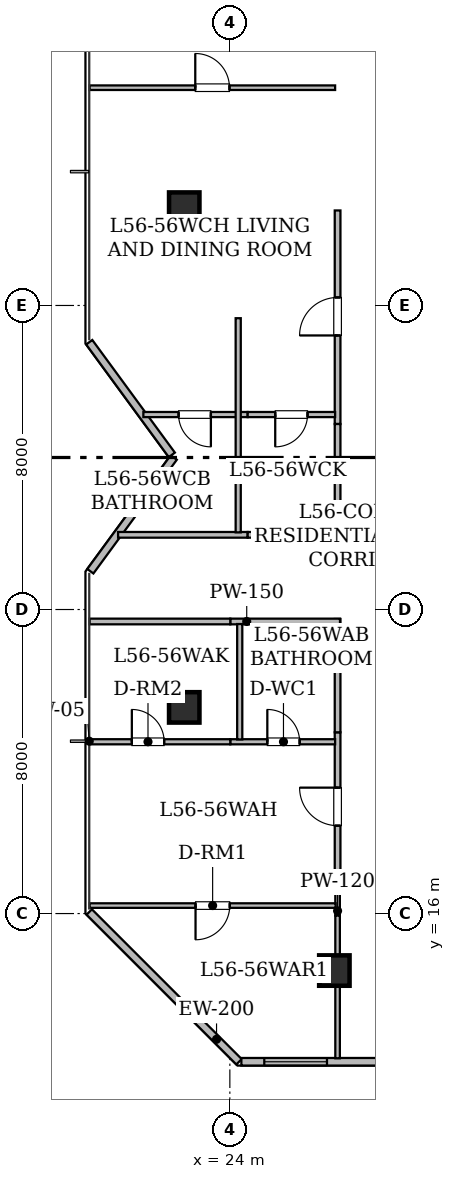
"""IFC4 building model, lengths in metres.
Left out: names, types, materials, properties, quantities, classifications, styles, units other than length and angle.
Written with IfcOpenShell. Run it as: python <this file> out.ifc"""

import sys

from ifc_helpers import new_model, si_unit, direction, frame, frame_2d, origin, origin_2d, place, context, subcontext, project, spatial, rectangle, hollow_rectangle, extrude, element, fill, save


model = new_model("IFC4")
c1 = context("Model", 3, precision=1e-05, world=origin(), true_north=direction((0.0, 1.0)))
c2 = subcontext(c1, "Body", "Model", "MODEL_VIEW")
j1 = project(units=[si_unit("LENGTHUNIT", "METRE"), si_unit("PLANEANGLEUNIT", "RADIAN")], contexts=[c1])
p1 = place(None, origin())
s1 = spatial("IfcSite", under=j1, at=p1, CompositionType="ELEMENT")
p2 = place(p1, origin())
s2 = spatial("IfcBuilding", under=s1, at=p2, CompositionType="ELEMENT")
p3 = place(p2, frame((0.0, 0.0, 220.85)))
s3 = spatial("IfcBuildingStorey", under=s2, at=p3, CompositionType="ELEMENT", Elevation=220.85)
for number, where, z_axis, x_axis in (
    (1, (26.75, 14.5, 0.0), (0.0, 0.0, 1.0), (1.0, 0.0, 0.0)),
    (2, (22.8, 21.425, 0.0), (0.0, 0.0, 1.0), (1.0, 0.0, 0.0)),
    (3, (22.8, 34.575, 0.0), (0.0, 0.0, 1.0), (1.0, 0.0, 0.0)),
):
    element("IfcColumn", number, at=place(p3, frame(where, z_axis=z_axis, x_axis=x_axis)), inside=s3, PredefinedType="COLUMN", context=c2, shape_type="SweptSolid", body=[
        extrude(hollow_rectangle(XDim=0.8, YDim=0.8, WallThickness=0.04, at=origin_2d()), origin(), (0.0, 0.0, 1.0), 3.65),
    ])
p4 = place(p3, frame((24.241, 12.1, 0.0), z_axis=(0.0, 0.0, 1.0), x_axis=(-0.707106781187, 0.707106781187, 0.0)))
e4 = element("IfcWall", 4, at=p4, inside=s3, PredefinedType="STANDARD", context=c2, shape_type="SweptSolid", body=[
    extrude(rectangle(XDim=5.573, YDim=0.2, at=frame_2d((2.787, 0.0))), origin(), (0.0, 0.0, 1.0), 3.43),
])
p5 = place(p3, frame((20.329, 25.007, 0.0), z_axis=(0.0, 0.0, 1.0), x_axis=(0.591366515379, 0.806402904564, 0.0)))
e5 = element("IfcWall", 5, at=p5, inside=s3, PredefinedType="STANDARD", context=c2, shape_type="SweptSolid", body=[
    extrude(rectangle(XDim=3.711, YDim=0.2, at=frame_2d((1.856, 0.0))), origin(), (0.0, 0.0, 1.0), 3.43),
])
p6 = place(p3, frame((22.473, 28.069, 0.0), z_axis=(0.0, 0.0, 1.0), x_axis=(-0.591248456881, 0.80648946815, 0.0)))
e6 = element("IfcWall", 6, at=p6, inside=s3, PredefinedType="STANDARD", context=c2, shape_type="SweptSolid", body=[
    extrude(rectangle(XDim=3.675, YDim=0.2, at=frame_2d((1.837, 0.0))), origin(), (0.0, 0.0, 1.0), 3.43),
])
p7 = place(p3, frame((65.696, 12.1, 0.0), z_axis=(0.0, 0.0, 1.0), x_axis=(-1.0, 0.0, 0.0)))
e7 = element("IfcWall", 7, at=p7, inside=s3, PredefinedType="STANDARD", context=c2, shape_type="SweptSolid", body=[
    extrude(rectangle(XDim=41.393, YDim=0.2, at=frame_2d((20.697, 0.0))), origin(), (0.0, 0.0, 1.0), 3.43),
])
p8 = place(p7, frame((34.521, 0.0, 0.85)))
e8 = element("IfcOpeningElement", 8, at=p8, cuts=e7, PredefinedType="OPENING", context=c2, shape_type="SweptSolid", body=[
    extrude(rectangle(XDim=1.65, YDim=1.55, at=frame_2d((0.825, 0.775))), frame((0.0, 0.11, 0.0), z_axis=(0.0, -1.0, 0.0), x_axis=(1.0, 0.0, 0.0)), (0.0, 0.0, 1.0), 0.22),
])
p9 = place(p7, frame((39.14, 0.0, 0.85)))
e9 = element("IfcOpeningElement", 9, at=p9, cuts=e7, PredefinedType="OPENING", context=c2, shape_type="SweptSolid", body=[
    extrude(rectangle(XDim=1.65, YDim=1.55, at=frame_2d((0.825, 0.775))), frame((0.0, 0.11, 0.0), z_axis=(0.0, -1.0, 0.0), x_axis=(1.0, 0.0, 0.0)), (0.0, 0.0, 1.0), 0.22),
])
p10 = place(p7, frame((15.596, 0.0, 0.8)))
e10 = element("IfcOpeningElement", 10, at=p10, cuts=e7, PredefinedType="OPENING", context=c2, shape_type="SweptSolid", body=[
    extrude(rectangle(XDim=1.2, YDim=1.5, at=frame_2d((0.6, 0.75))), frame((0.0, 0.11, 0.0), z_axis=(0.0, -1.0, 0.0), x_axis=(1.0, 0.0, 0.0)), (0.0, 0.0, 1.0), 0.22),
])
p11 = place(p7, frame((19.706, 0.0, 0.85)))
e11 = element("IfcOpeningElement", 11, at=p11, cuts=e7, PredefinedType="OPENING", context=c2, shape_type="SweptSolid", body=[
    extrude(rectangle(XDim=1.65, YDim=1.55, at=frame_2d((0.825, 0.775))), frame((0.0, 0.11, 0.0), z_axis=(0.0, -1.0, 0.0), x_axis=(1.0, 0.0, 0.0)), (0.0, 0.0, 1.0), 0.22),
])
p12 = place(p7, frame((11.036, 0.0, 0.85)))
e12 = element("IfcOpeningElement", 12, at=p12, cuts=e7, PredefinedType="OPENING", context=c2, shape_type="SweptSolid", body=[
    extrude(rectangle(XDim=1.65, YDim=1.55, at=frame_2d((0.825, 0.775))), frame((0.0, 0.11, 0.0), z_axis=(0.0, -1.0, 0.0), x_axis=(1.0, 0.0, 0.0)), (0.0, 0.0, 1.0), 0.22),
])
p13 = place(p7, frame((4.786, 0.0, 0.85)))
e13 = element("IfcOpeningElement", 13, at=p13, cuts=e7, PredefinedType="OPENING", context=c2, shape_type="SweptSolid", body=[
    extrude(rectangle(XDim=1.65, YDim=1.55, at=frame_2d((0.825, 0.775))), frame((0.0, 0.11, 0.0), z_axis=(0.0, -1.0, 0.0), x_axis=(1.0, 0.0, 0.0)), (0.0, 0.0, 1.0), 0.22),
])
p14 = place(p3, frame((34.114, 16.835, 0.0), z_axis=(0.0, 0.0, 1.0), x_axis=(-1.0, 0.0, 0.0)))
e14 = element("IfcWall", 14, at=p14, inside=s3, PredefinedType="STANDARD", context=c2, shape_type="SweptSolid", body=[
    extrude(rectangle(XDim=7.214, YDim=0.15, at=frame_2d((3.607, 0.0))), origin(), (0.0, 0.0, 1.0), 2.725),
])
p15 = place(p14, frame((3.053, 0.0, 0.0)))
e15 = element("IfcOpeningElement", 15, at=p15, cuts=e14, PredefinedType="OPENING", context=c2, shape_type="SweptSolid", body=[
    extrude(rectangle(XDim=1.15, YDim=2.2, at=frame_2d((0.575, 1.1))), frame((0.0, 0.085, 0.0), z_axis=(0.0, -1.0, 0.0), x_axis=(1.0, 0.0, 0.0)), (0.0, 0.0, 1.0), 0.17),
])
p16 = place(p3, frame((26.835, 16.9, 0.0), z_axis=(0.0, 0.0, 1.0), x_axis=(0.0, 1.0, 0.0)))
e16 = element("IfcWall", 16, at=p16, inside=s3, PredefinedType="STANDARD", context=c2, shape_type="SweptSolid", body=[
    extrude(rectangle(XDim=3.869, YDim=0.15, at=frame_2d((1.935, 0.0))), origin(), (0.0, 0.0, 1.0), 2.725),
])
p17 = place(p16, frame((1.413, 0.0, 0.0)))
e17 = element("IfcOpeningElement", 17, at=p17, cuts=e16, PredefinedType="OPENING", context=c2, shape_type="SweptSolid", body=[
    extrude(rectangle(XDim=1.0, YDim=2.15, at=frame_2d((0.5, 1.075))), frame((0.0, 0.085, 0.0), z_axis=(0.0, -1.0, 0.0), x_axis=(1.0, 0.0, 0.0)), (0.0, 0.0, 1.0), 0.17),
])
p18 = place(p3, frame((26.835, 20.769, 0.0), z_axis=(0.0, 0.0, 1.0), x_axis=(0.0, 1.0, 0.0)))
e18 = element("IfcWall", 18, at=p18, inside=s3, PredefinedType="STANDARD", context=c2, shape_type="SweptSolid", body=[
    extrude(rectangle(XDim=2.981, YDim=0.15, at=frame_2d((1.49, 0.0))), origin(), (0.0, 0.0, 1.0), 3.43),
])
p19 = place(p3, frame((26.898, 23.685, 0.0), z_axis=(0.0, 0.0, 1.0), x_axis=(-1.0, 0.0, 0.0)))
e19 = element("IfcWall", 19, at=p19, inside=s3, PredefinedType="STANDARD", context=c2, shape_type="SweptSolid", body=[
    extrude(rectangle(XDim=2.887, YDim=0.15, at=frame_2d((1.443, 0.0))), origin(), (0.0, 0.0, 1.0), 3.43),
])
p20 = place(p3, frame((24.011, 23.685, 0.0), z_axis=(0.0, 0.0, 1.0), x_axis=(-1.0, 0.0, 0.0)))
e20 = element("IfcWall", 20, at=p20, inside=s3, PredefinedType="STANDARD", context=c2, shape_type="SweptSolid", body=[
    extrude(rectangle(XDim=3.701, YDim=0.15, at=frame_2d((1.851, 0.0))), origin(), (0.0, 0.0, 1.0), 2.887),
])
p21 = place(p3, frame((26.835, 28.881, 0.0), z_axis=(0.0, 0.0, 1.0), x_axis=(0.0, 1.0, 0.0)))
e21 = element("IfcWall", 21, at=p21, inside=s3, PredefinedType="STANDARD", context=c2, shape_type="SweptSolid", body=[
    extrude(rectangle(XDim=5.619, YDim=0.15, at=frame_2d((2.81, 0.0))), origin(), (0.0, 0.0, 1.0), 3.065),
])
p22 = place(p21, frame((2.33, 0.0, 0.0)))
e22 = element("IfcOpeningElement", 22, at=p22, cuts=e21, PredefinedType="OPENING", context=c2, shape_type="SweptSolid", body=[
    extrude(rectangle(XDim=1.0, YDim=2.15, at=frame_2d((0.5, 1.075))), frame((0.0, 0.085, 0.0), z_axis=(0.0, -1.0, 0.0), x_axis=(1.0, 0.0, 0.0)), (0.0, 0.0, 1.0), 0.17),
])
p23 = place(p3, frame((21.059, 25.965, 0.0), z_axis=(0.0, 0.0, 1.0), x_axis=(1.0, 0.0, 0.0)))
e23 = element("IfcWall", 23, at=p23, inside=s3, PredefinedType="STANDARD", context=c2, shape_type="SweptSolid", body=[
    extrude(rectangle(XDim=3.41, YDim=0.15, at=frame_2d((1.705, 0.0))), origin(), (0.0, 0.0, 1.0), 2.887),
])
p24 = place(p3, frame((24.469, 25.965, 0.0), z_axis=(0.0, 0.0, 1.0), x_axis=(1.0, 0.0, 0.0)))
e24 = element("IfcWall", 24, at=p24, inside=s3, PredefinedType="STANDARD", context=c2, shape_type="SweptSolid", body=[
    extrude(rectangle(XDim=2.431, YDim=0.15, at=frame_2d((1.215, 0.0))), origin(), (0.0, 0.0, 1.0), 3.43),
])
p25 = place(p3, frame((26.835, 25.9, 0.0), z_axis=(0.0, 0.0, 1.0), x_axis=(0.0, 1.0, 0.0)))
e25 = element("IfcWall", 25, at=p25, inside=s3, PredefinedType="STANDARD", context=c2, shape_type="SweptSolid", body=[
    extrude(rectangle(XDim=2.981, YDim=0.15, at=frame_2d((1.491, 0.0))), origin(), (0.0, 0.0, 1.0), 3.43),
])
p26 = place(p3, frame((26.835, 15.947, 0.0), z_axis=(0.0, 0.0, 1.0), x_axis=(0.0, 1.0, 0.0)))
e26 = element("IfcWall", 26, at=p26, inside=s3, PredefinedType="PARTITIONING", context=c2, shape_type="SweptSolid", body=[
    extrude(rectangle(XDim=0.823, YDim=0.12, at=frame_2d((0.412, 0.0))), origin(), (0.0, 0.0, 1.0), 3.43),
])
p27 = place(p3, frame((26.835, 12.192, 0.0), z_axis=(0.0, 0.0, 1.0), x_axis=(0.0, 1.0, 0.0)))
e27 = element("IfcWall", 27, at=p27, inside=s3, PredefinedType="PARTITIONING", context=c2, shape_type="SweptSolid", body=[
    extrude(rectangle(XDim=3.755, YDim=0.12, at=frame_2d((1.877, 0.0))), origin(), (0.0, 0.0, 1.0), 2.725),
])
p28 = place(p3, frame((24.011, 20.52, 0.0), z_axis=(0.0, 0.0, 1.0), x_axis=(1.0, 0.0, 0.0)))
e28 = element("IfcWall", 28, at=p28, inside=s3, PredefinedType="PARTITIONING", context=c2, shape_type="SweptSolid", body=[
    extrude(rectangle(XDim=2.759, YDim=0.135, at=frame_2d((1.379, 0.0))), origin(), (0.0, 0.0, 1.0), 2.725),
])
p29 = place(p28, frame((0.975, 0.0, 0.0)))
e29 = element("IfcOpeningElement", 29, at=p29, cuts=e28, PredefinedType="OPENING", context=c2, shape_type="SweptSolid", body=[
    extrude(rectangle(XDim=0.85, YDim=2.1, at=frame_2d((0.425, 1.05))), frame((0.0, 0.077, 0.0), z_axis=(0.0, -1.0, 0.0), x_axis=(1.0, 0.0, 0.0)), (0.0, 0.0, 1.0), 0.155),
])
p30 = place(p3, frame((20.31, 20.52, 0.0), z_axis=(0.0, 0.0, 1.0), x_axis=(1.0, 0.0, 0.0)))
e30 = element("IfcWall", 30, at=p30, inside=s3, PredefinedType="PARTITIONING", context=c2, shape_type="SweptSolid", body=[
    extrude(rectangle(XDim=3.701, YDim=0.135, at=frame_2d((1.851, 0.0))), origin(), (0.0, 0.0, 1.0), 2.887),
])
p31 = place(p30, frame((1.111, 0.0, 0.0)))
e31 = element("IfcOpeningElement", 31, at=p31, cuts=e30, PredefinedType="OPENING", context=c2, shape_type="SweptSolid", body=[
    extrude(rectangle(XDim=0.85, YDim=2.1, at=frame_2d((0.425, 1.05))), frame((0.0, 0.077, 0.0), z_axis=(0.0, -1.0, 0.0), x_axis=(1.0, 0.0, 0.0)), (0.0, 0.0, 1.0), 0.155),
])
p32 = place(p3, frame((26.783, 16.21, 0.0), z_axis=(0.0, 0.0, 1.0), x_axis=(-1.0, 0.0, 0.0)))
e32 = element("IfcWall", 32, at=p32, inside=s3, PredefinedType="PARTITIONING", context=c2, shape_type="SweptSolid", body=[
    extrude(rectangle(XDim=6.473, YDim=0.12, at=frame_2d((3.236, 0.0))), origin(), (0.0, 0.0, 1.0), 2.887),
])
p33 = place(p32, frame((2.786, 0.0, 0.0)))
e33 = element("IfcOpeningElement", 33, at=p33, cuts=e32, PredefinedType="OPENING", context=c2, shape_type="SweptSolid", body=[
    extrude(rectangle(XDim=0.9, YDim=2.1, at=frame_2d((0.45, 1.05))), frame((0.0, 0.07, 0.0), z_axis=(0.0, -1.0, 0.0), x_axis=(1.0, 0.0, 0.0)), (0.0, 0.0, 1.0), 0.14),
])
p34 = place(p3, frame((24.26, 20.581, 0.0), z_axis=(0.0, 0.0, 1.0), x_axis=(0.0, 1.0, 0.0)))
e34 = element("IfcWall", 34, at=p34, inside=s3, PredefinedType="PARTITIONING", context=c2, shape_type="SweptSolid", body=[
    extrude(rectangle(XDim=3.037, YDim=0.135, at=frame_2d((1.519, 0.0))), origin(), (0.0, 0.0, 1.0), 2.725),
])
p35 = place(p3, frame((24.469, 29.13, 0.0), z_axis=(0.0, 0.0, 1.0), x_axis=(-1.0, 0.0, 0.0)))
e35 = element("IfcWall", 35, at=p35, inside=s3, PredefinedType="PARTITIONING", context=c2, shape_type="SweptSolid", body=[
    extrude(rectangle(XDim=2.745, YDim=0.135, at=frame_2d((1.373, 0.0))), origin(), (0.0, 0.0, 1.0), 2.887),
])
p36 = place(p35, frame((0.968, 0.0, 0.0)))
e36 = element("IfcOpeningElement", 36, at=p36, cuts=e35, PredefinedType="OPENING", context=c2, shape_type="SweptSolid", body=[
    extrude(rectangle(XDim=0.85, YDim=2.1, at=frame_2d((0.425, 1.05))), frame((0.0, 0.077, 0.0), z_axis=(0.0, -1.0, 0.0), x_axis=(1.0, 0.0, 0.0)), (0.0, 0.0, 1.0), 0.155),
])
p37 = place(p3, frame((26.77, 29.13, 0.0), z_axis=(0.0, 0.0, 1.0), x_axis=(-1.0, 0.0, 0.0)))
e37 = element("IfcWall", 37, at=p37, inside=s3, PredefinedType="PARTITIONING", context=c2, shape_type="SweptSolid", body=[
    extrude(rectangle(XDim=2.301, YDim=0.135, at=frame_2d((1.15, 0.0))), origin(), (0.0, 0.0, 1.0), 3.43),
])
p38 = place(p37, frame((0.726, 0.0, 0.0)))
e38 = element("IfcOpeningElement", 38, at=p38, cuts=e37, PredefinedType="OPENING", context=c2, shape_type="SweptSolid", body=[
    extrude(rectangle(XDim=0.85, YDim=2.1, at=frame_2d((0.425, 1.05))), frame((0.0, 0.077, 0.0), z_axis=(0.0, -1.0, 0.0), x_axis=(1.0, 0.0, 0.0)), (0.0, 0.0, 1.0), 0.155),
])
p39 = place(p3, frame((20.31, 37.73, 0.0), z_axis=(0.0, 0.0, 1.0), x_axis=(1.0, 0.0, 0.0)))
e39 = element("IfcWall", 39, at=p39, inside=s3, PredefinedType="PARTITIONING", context=c2, shape_type="SweptSolid", body=[
    extrude(rectangle(XDim=6.46, YDim=0.12, at=frame_2d((3.23, 0.0))), origin(), (0.0, 0.0, 1.0), 2.887),
])
p40 = place(p39, frame((2.78, 0.0, 0.0)))
e40 = element("IfcOpeningElement", 40, at=p40, cuts=e39, PredefinedType="OPENING", context=c2, shape_type="SweptSolid", body=[
    extrude(rectangle(XDim=0.9, YDim=2.1, at=frame_2d((0.45, 1.05))), frame((0.0, 0.07, 0.0), z_axis=(0.0, -1.0, 0.0), x_axis=(1.0, 0.0, 0.0)), (0.0, 0.0, 1.0), 0.14),
])
p41 = place(p3, frame((24.22, 31.665, 0.0), z_axis=(0.0, 0.0, 1.0), x_axis=(0.0, -1.0, 0.0)))
e41 = element("IfcWall", 41, at=p41, inside=s3, PredefinedType="PARTITIONING", context=c2, shape_type="SweptSolid", body=[
    extrude(rectangle(XDim=5.635, YDim=0.135, at=frame_2d((2.817, 0.0))), origin(), (0.0, 0.0, 1.0), 3.43),
])
p42 = place(p9, origin())
e42 = element("IfcWindow", 42, at=p42, inside=s3, PartitioningType="SINGLE_PANEL", PredefinedType="WINDOW", context=c2, shape_type="SweptSolid", body=[
    extrude(rectangle(XDim=1.65, YDim=1.55, at=frame_2d((0.825, 0.775))), frame((0.0, 0.03, 0.0), z_axis=(0.0, -1.0, 0.0), x_axis=(1.0, 0.0, 0.0)), (0.0, 0.0, 1.0), 0.06),
])
fill(e9, e42)
p43 = place(p17, origin())
e43 = element("IfcDoor", 43, at=p43, inside=s3, OperationType="SINGLE_SWING_RIGHT", PredefinedType="DOOR", context=c2, shape_type="SweptSolid", body=[
    extrude(rectangle(XDim=1.0, YDim=2.15, at=frame_2d((0.5, 1.075))), frame((0.0, 0.025, 0.0), z_axis=(0.0, -1.0, 0.0), x_axis=(1.0, 0.0, 0.0)), (0.0, 0.0, 1.0), 0.05),
])
fill(e17, e43)
p44 = place(p22, origin())
e44 = element("IfcDoor", 44, at=p44, inside=s3, OperationType="SINGLE_SWING_LEFT", PredefinedType="DOOR", context=c2, shape_type="SweptSolid", body=[
    extrude(rectangle(XDim=1.0, YDim=2.15, at=frame_2d((0.5, 1.075))), frame((0.0, 0.025, 0.0), z_axis=(0.0, -1.0, 0.0), x_axis=(1.0, 0.0, 0.0)), (0.0, 0.0, 1.0), 0.05),
])
fill(e22, e44)
p45 = place(p29, origin())
e45 = element("IfcDoor", 45, at=p45, inside=s3, OperationType="SINGLE_SWING_LEFT", PredefinedType="DOOR", context=c2, shape_type="SweptSolid", body=[
    extrude(rectangle(XDim=0.85, YDim=2.1, at=frame_2d((0.425, 1.05))), frame((0.0, 0.025, 0.0), z_axis=(0.0, -1.0, 0.0), x_axis=(1.0, 0.0, 0.0)), (0.0, 0.0, 1.0), 0.05),
])
fill(e29, e45)
p46 = place(p31, origin())
e46 = element("IfcDoor", 46, at=p46, inside=s3, OperationType="SINGLE_SWING_LEFT", PredefinedType="DOOR", context=c2, shape_type="SweptSolid", body=[
    extrude(rectangle(XDim=0.85, YDim=2.1, at=frame_2d((0.425, 1.05))), frame((0.0, 0.025, 0.0), z_axis=(0.0, -1.0, 0.0), x_axis=(1.0, 0.0, 0.0)), (0.0, 0.0, 1.0), 0.05),
])
fill(e31, e46)
p47 = place(p33, origin())
e47 = element("IfcDoor", 47, at=p47, inside=s3, OperationType="SINGLE_SWING_RIGHT", PredefinedType="DOOR", context=c2, shape_type="SweptSolid", body=[
    extrude(rectangle(XDim=0.9, YDim=2.1, at=frame_2d((0.45, 1.05))), frame((0.0, 0.025, 0.0), z_axis=(0.0, -1.0, 0.0), x_axis=(1.0, 0.0, 0.0)), (0.0, 0.0, 1.0), 0.05),
])
fill(e33, e47)
p48 = place(p36, origin())
e48 = element("IfcDoor", 48, at=p48, inside=s3, OperationType="SINGLE_SWING_LEFT", PredefinedType="DOOR", context=c2, shape_type="SweptSolid", body=[
    extrude(rectangle(XDim=0.85, YDim=2.1, at=frame_2d((0.425, 1.05))), frame((0.0, 0.025, 0.0), z_axis=(0.0, -1.0, 0.0), x_axis=(1.0, 0.0, 0.0)), (0.0, 0.0, 1.0), 0.05),
])
fill(e36, e48)
p49 = place(p38, origin())
e49 = element("IfcDoor", 49, at=p49, inside=s3, OperationType="SINGLE_SWING_RIGHT", PredefinedType="DOOR", context=c2, shape_type="SweptSolid", body=[
    extrude(rectangle(XDim=0.85, YDim=2.1, at=frame_2d((0.425, 1.05))), frame((0.0, 0.025, 0.0), z_axis=(0.0, -1.0, 0.0), x_axis=(1.0, 0.0, 0.0)), (0.0, 0.0, 1.0), 0.05),
])
fill(e38, e49)
p50 = place(p40, origin())
e50 = element("IfcDoor", 50, at=p50, inside=s3, OperationType="SINGLE_SWING_LEFT", PredefinedType="DOOR", context=c2, shape_type="SweptSolid", body=[
    extrude(rectangle(XDim=0.9, YDim=2.1, at=frame_2d((0.45, 1.05))), frame((0.0, 0.025, 0.0), z_axis=(0.0, -1.0, 0.0), x_axis=(1.0, 0.0, 0.0)), (0.0, 0.0, 1.0), 0.05),
])
fill(e40, e50)
save(model, sys.argv[1])
